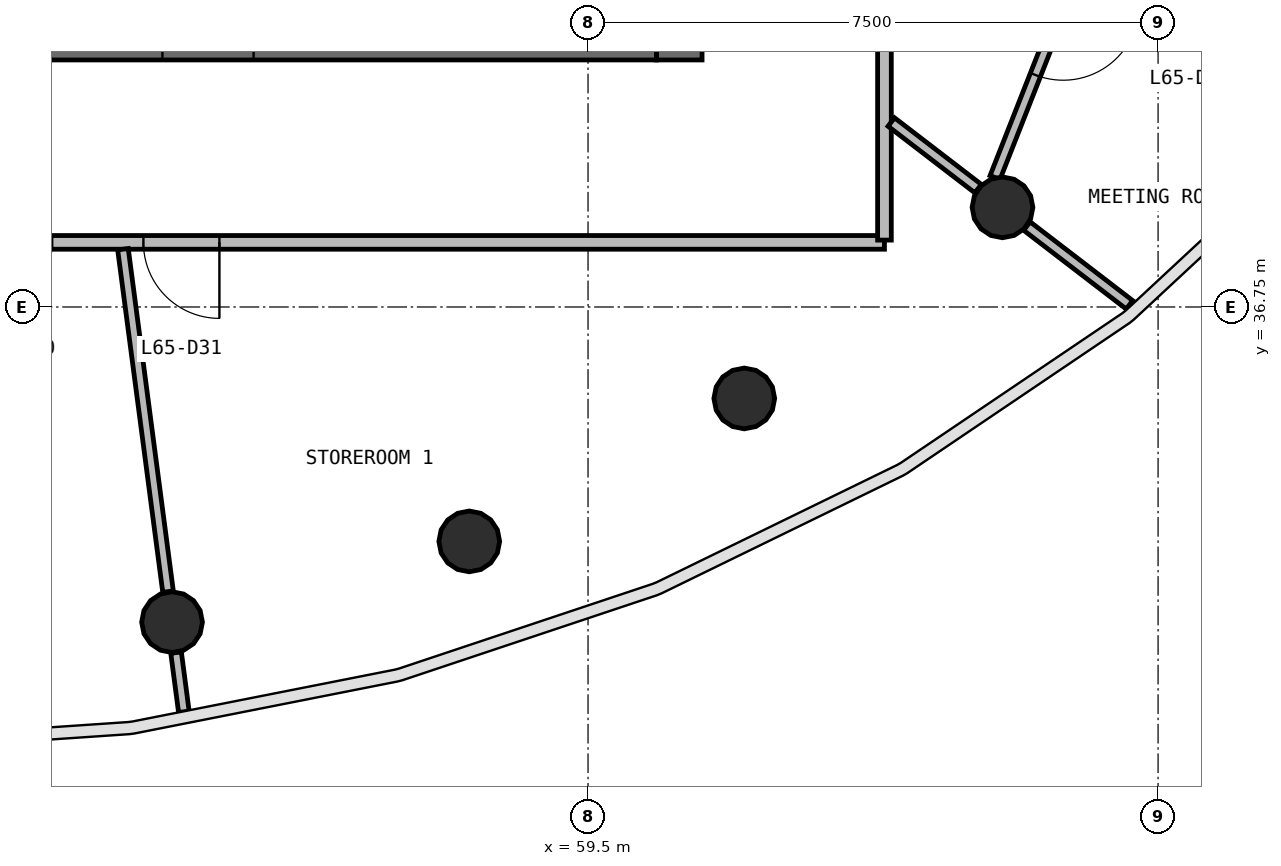
"""IFC4 building model, lengths in metres.
Left out: names, types, materials, properties, quantities, classifications, styles, units other than length and angle.
Written with IfcOpenShell. Run it as: python <this file> out.ifc"""

import sys

from ifc_helpers import new_model, si_unit, direction, frame, frame_2d, origin, origin_2d, place, context, subcontext, project, spatial, rectangle, circle, extrude, source, transform, mapped, element, fill, save


model = new_model("IFC4")
c1 = context("Model", 3, precision=1e-05, world=origin(), true_north=direction((0.0, 1.0)))
c2 = subcontext(c1, "Body", "Model", "MODEL_VIEW")
j1 = project(units=[si_unit("LENGTHUNIT", "METRE"), si_unit("PLANEANGLEUNIT", "RADIAN")], contexts=[c1])
p1 = place(None, origin())
s1 = spatial("IfcSite", under=j1, at=p1, CompositionType="ELEMENT")
p2 = place(p1, origin())
s2 = spatial("IfcBuilding", under=s1, at=p2, CompositionType="ELEMENT")
p3 = place(p2, frame((0.0, 0.0, 265.7)))
s3 = spatial("IfcBuildingStorey", under=s2, at=p3, CompositionType="ELEMENT", Elevation=265.7)
p4 = place(p3, frame((60.7, 40.0, 0.0), z_axis=(0.0, 0.0, 1.0), x_axis=(0.0, 1.0, 0.0)))
e1 = element("IfcWall", 1, at=p4, inside=s3, PredefinedType="SHEAR", context=c2, shape_type="SweptSolid", body=[
    extrude(rectangle(XDim=16.0, YDim=0.6, at=frame_2d((8.0, 0.0))), origin(), (0.0, 0.0, 1.0), 3.9),
])
p5 = place(p4, frame((7.1, 0.0, 0.0)))
e2 = element("IfcOpeningElement", 2, at=p5, cuts=e1, PredefinedType="OPENING", context=c2, shape_type="SweptSolid", body=[
    extrude(rectangle(XDim=1.8, YDim=2.1, at=frame_2d((0.9, 1.05))), frame((0.0, 0.31, 0.0), z_axis=(0.0, -1.0, 0.0), x_axis=(1.0, 0.0, 0.0)), (0.0, 0.0, 1.0), 0.62),
])
p6 = place(p3, frame((43.6, 40.3, 0.0), z_axis=(0.0, 0.0, 1.0), x_axis=(1.0, 0.0, 0.0)))
e3 = element("IfcWall", 3, at=p6, inside=s3, PredefinedType="SHEAR", context=c2, shape_type="SweptSolid", body=[
    extrude(rectangle(XDim=16.8, YDim=0.6, at=frame_2d((8.4, 0.0))), origin(), (0.0, 0.0, 1.0), 3.9),
])
p7 = place(p6, frame((10.3, 0.0, 0.0)))
e4 = element("IfcOpeningElement", 4, at=p7, cuts=e3, PredefinedType="OPENING", context=c2, shape_type="SweptSolid", body=[
    extrude(rectangle(XDim=1.2, YDim=2.1, at=frame_2d((0.6, 1.05))), frame((0.0, 0.31, 0.0), z_axis=(0.0, -1.0, 0.0), x_axis=(1.0, 0.0, 0.0)), (0.0, 0.0, 1.0), 0.62),
])
p8 = place(p6, frame((7.25, 0.0, 0.0)))
e5 = element("IfcOpeningElement", 5, at=p8, cuts=e3, PredefinedType="OPENING", context=c2, shape_type="SweptSolid", body=[
    extrude(rectangle(XDim=1.1, YDim=2.1, at=frame_2d((0.55, 1.05))), frame((0.0, 0.31, 0.0), z_axis=(0.0, -1.0, 0.0), x_axis=(1.0, 0.0, 0.0)), (0.0, 0.0, 1.0), 0.62),
])
p9 = place(p6, frame((0.7, 0.0, 0.0)))
e6 = element("IfcOpeningElement", 6, at=p9, cuts=e3, PredefinedType="OPENING", context=c2, shape_type="SweptSolid", body=[
    extrude(rectangle(XDim=0.8, YDim=2.1, at=frame_2d((0.4, 1.05))), frame((0.0, 0.31, 0.0), z_axis=(0.0, -1.0, 0.0), x_axis=(1.0, 0.0, 0.0)), (0.0, 0.0, 1.0), 0.62),
])
m1 = source(origin(), c2, "Body", "SweptSolid", [
    extrude(circle(Radius=0.4, at=origin_2d()), origin(), (0.0, 0.0, 1.0), 3.9),
])
for number, where, z_axis, x_axis in (
    (7, (54.027, 32.604, 0.0), (0.0, 0.0, 1.0), (1.0, 0.0, 0.0)),
    (8, (57.937, 33.666, 0.0), (0.0, 0.0, 1.0), (1.0, 0.0, 0.0)),
    (9, (61.556, 35.547, 0.0), (0.0, 0.0, 1.0), (1.0, 0.0, 0.0)),
    (10, (64.953, 38.061, 0.0), (0.0, 0.0, 1.0), (1.0, 0.0, 0.0)),
):
    element("IfcColumn", number, at=place(p3, frame(where, z_axis=z_axis, x_axis=x_axis)), inside=s3, PredefinedType="COLUMN", context=c2, shape_type="MappedRepresentation", body=[
        mapped(m1, transform((0.0, 0.0, 0.0), scale=1.0)),
    ])
p10 = place(p3, frame((63.4, 37.6, 0.0), z_axis=(0.0, 0.0, 1.0), x_axis=(-1.0, 0.0, 0.0)))
e11 = element("IfcWall", 11, at=p10, inside=s3, PredefinedType="PARTITIONING", context=c2, shape_type="SweptSolid", body=[
    extrude(rectangle(XDim=22.8, YDim=0.18, at=frame_2d((11.4, 0.0))), origin(), (0.0, 0.0, 1.0), 2.92),
])
p11 = place(p10, frame((16.15, 0.0, 0.0)))
e12 = element("IfcOpeningElement", 12, at=p11, cuts=e11, PredefinedType="OPENING", context=c2, shape_type="SweptSolid", body=[
    extrude(rectangle(XDim=1.0, YDim=2.1, at=frame_2d((0.5, 1.05))), frame((0.0, 0.1, 0.0), z_axis=(0.0, -1.0, 0.0), x_axis=(1.0, 0.0, 0.0)), (0.0, 0.0, 1.0), 0.2),
])
p12 = place(p10, frame((10.95, 0.0, 0.0)))
e13 = element("IfcOpeningElement", 13, at=p12, cuts=e11, PredefinedType="OPENING", context=c2, shape_type="SweptSolid", body=[
    extrude(rectangle(XDim=1.0, YDim=2.1, at=frame_2d((0.5, 1.05))), frame((0.0, 0.1, 0.0), z_axis=(0.0, -1.0, 0.0), x_axis=(1.0, 0.0, 0.0)), (0.0, 0.0, 1.0), 0.2),
])
p13 = place(p10, frame((8.75, 0.0, 0.0)))
e14 = element("IfcOpeningElement", 14, at=p13, cuts=e11, PredefinedType="OPENING", context=c2, shape_type="SweptSolid", body=[
    extrude(rectangle(XDim=1.0, YDim=2.1, at=frame_2d((0.5, 1.05))), frame((0.0, 0.1, 0.0), z_axis=(0.0, -1.0, 0.0), x_axis=(1.0, 0.0, 0.0)), (0.0, 0.0, 1.0), 0.2),
])
p14 = place(p3, frame((63.4, 58.37, 0.0), z_axis=(0.0, 0.0, 1.0), x_axis=(0.0, -1.0, 0.0)))
e15 = element("IfcWall", 15, at=p14, inside=s3, PredefinedType="PARTITIONING", context=c2, shape_type="SweptSolid", body=[
    extrude(rectangle(XDim=20.74, YDim=0.18, at=frame_2d((10.37, 0.0))), origin(), (0.0, 0.0, 1.0), 2.92),
])
p15 = place(p14, frame((9.89, 0.0, 0.0)))
e16 = element("IfcOpeningElement", 16, at=p15, cuts=e15, PredefinedType="OPENING", context=c2, shape_type="SweptSolid", body=[
    extrude(rectangle(XDim=1.0, YDim=2.1, at=frame_2d((0.5, 1.05))), frame((0.0, 0.1, 0.0), z_axis=(0.0, -1.0, 0.0), x_axis=(1.0, 0.0, 0.0)), (0.0, 0.0, 1.0), 0.2),
])
p16 = place(p3, frame((53.381, 37.51, 0.0), z_axis=(0.0, 0.0, 1.0), x_axis=(0.130505936446, -0.991447527887, 0.0)))
e17 = element("IfcWall", 17, at=p16, inside=s3, PredefinedType="PARTITIONING", context=c2, shape_type="SweptSolid", body=[
    extrude(rectangle(XDim=4.544, YDim=0.14, at=frame_2d((2.272, 0.0))), origin(), (0.0, 0.0, 1.0), 2.92),
])
p17 = place(p3, frame((66.272, 42.056, 0.0), z_axis=(0.0, 0.0, 1.0), x_axis=(-0.365958681955, -0.930631099363, 0.0)))
e18 = element("IfcWall", 18, at=p17, inside=s3, PredefinedType="PARTITIONING", context=c2, shape_type="SweptSolid", body=[
    extrude(rectangle(XDim=3.871, YDim=0.14, at=frame_2d((1.936, 0.0))), origin(), (0.0, 0.0, 1.0), 2.92),
])
p18 = place(p17, frame((1.421, 0.0, 0.0)))
e19 = element("IfcOpeningElement", 19, at=p18, cuts=e18, PredefinedType="OPENING", context=c2, shape_type="SweptSolid", body=[
    extrude(rectangle(XDim=1.0, YDim=2.1, at=frame_2d((0.5, 1.05))), frame((0.0, 0.08, 0.0), z_axis=(0.0, -1.0, 0.0), x_axis=(1.0, 0.0, 0.0)), (0.0, 0.0, 1.0), 0.16),
])
p19 = place(p3, frame((65.274, 37.814, 0.0), z_axis=(0.0, 0.0, 1.0), x_axis=(0.793391519138, -0.608711670136, 0.0)))
e20 = element("IfcWall", 20, at=p19, inside=s3, PredefinedType="PARTITIONING", context=c2, shape_type="SweptSolid", body=[
    extrude(rectangle(XDim=1.701, YDim=0.14, at=frame_2d((0.851, 0.0))), origin(), (0.0, 0.0, 1.0), 2.92),
])
p20 = place(p3, frame((63.49, 39.183, 0.0), z_axis=(0.0, 0.0, 1.0), x_axis=(0.793316945216, -0.608808857059, 0.0)))
e21 = element("IfcWall", 21, at=p20, inside=s3, PredefinedType="PARTITIONING", context=c2, shape_type="SweptSolid", body=[
    extrude(rectangle(XDim=1.44, YDim=0.14, at=frame_2d((0.72, 0.0))), origin(), (0.0, 0.0, 1.0), 2.92),
])
p21 = place(p3, frame((54.08, 32.203, 0.0), z_axis=(0.0, 0.0, 1.0), x_axis=(0.130575144093, -0.991438415508, 0.0)))
e22 = element("IfcWall", 22, at=p21, inside=s3, PredefinedType="PARTITIONING", context=c2, shape_type="SweptSolid", body=[
    extrude(rectangle(XDim=0.785, YDim=0.14, at=frame_2d((0.393, 0.0))), origin(), (0.0, 0.0, 1.0), 2.92),
])
m2 = source(origin(), c2, "Body", "SweptSolid", [
    extrude(rectangle(XDim=1.0, YDim=2.1, at=frame_2d((0.5, 1.05))), frame((0.0, 0.025, 0.0), z_axis=(0.0, -1.0, 0.0), x_axis=(1.0, 0.0, 0.0)), (0.0, 0.0, 1.0), 0.05),
])
p22 = place(p13, origin())
e23 = element("IfcDoor", 23, at=p22, inside=s3, OperationType="SINGLE_SWING_LEFT", PredefinedType="DOOR", context=c2, shape_type="MappedRepresentation", body=[
    mapped(m2, transform((0.0, 0.0, 0.0), scale=1.0)),
])
fill(e14, e23)
p23 = place(p18, origin())
e24 = element("IfcDoor", 24, at=p23, inside=s3, OperationType="SINGLE_SWING_LEFT", PredefinedType="DOOR", context=c2, shape_type="MappedRepresentation", body=[
    mapped(m2, transform((0.0, 0.0, 0.0), scale=1.0)),
])
fill(e19, e24)
save(model, sys.argv[1])
